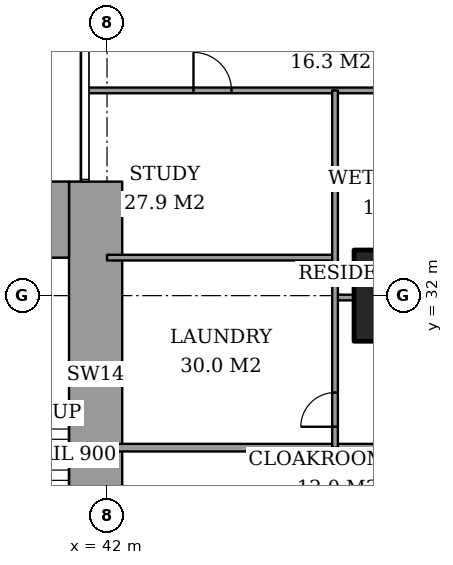
"""IFC4 building model, lengths in metres.
Left out: names, types, materials, properties, quantities, classifications, styles, units other than length and angle.
Written with IfcOpenShell. Run it as: python <this file> out.ifc"""

import sys

from ifc_helpers import new_model, si_unit, direction, frame, frame_2d, origin, origin_2d, place, context, subcontext, project, spatial, rectangle, extrude, element, fill, save


model = new_model("IFC4")
c1 = context("Model", 3, precision=1e-05, world=origin(), true_north=direction((0.0, 1.0)))
c2 = subcontext(c1, "Body", "Model", "MODEL_VIEW")
j1 = project(units=[si_unit("LENGTHUNIT", "METRE"), si_unit("PLANEANGLEUNIT", "RADIAN")], contexts=[c1])
p1 = place(None, origin())
s1 = spatial("IfcSite", under=j1, at=p1, CompositionType="ELEMENT")
p2 = place(p1, origin())
s2 = spatial("IfcBuilding", under=s1, at=p2, CompositionType="ELEMENT")
p3 = place(p2, frame((0.0, 0.0, 114.2)))
s3 = spatial("IfcBuildingStorey", under=s2, at=p3, CompositionType="ELEMENT", Elevation=114.2)
p4 = place(p3, frame((50.0, 32.0, 0.0), z_axis=(0.0, 0.0, 1.0), x_axis=(1.0, 0.0, 0.0)))
e1 = element("IfcColumn", 1, at=p4, inside=s3, PredefinedType="COLUMN", context=c2, shape_type="SweptSolid", body=[
    extrude(rectangle(XDim=3.0, YDim=2.4, at=origin_2d()), origin(), (0.0, 0.0, 1.0), 3.6),
])
p5 = place(p3, frame((37.85, 34.0, 0.0), z_axis=(0.0, 0.0, 1.0), x_axis=(1.0, 0.0, 0.0)))
e2 = element("IfcWall", 2, at=p5, inside=s3, PredefinedType="SHEAR", context=c2, shape_type="SweptSolid", body=[
    extrude(rectangle(XDim=3.15, YDim=2.0, at=frame_2d((1.575, 0.0))), origin(), (0.0, 0.0, 1.0), 3.6),
])
p6 = place(p3, frame((41.7, 24.85, 0.0), z_axis=(0.0, 0.0, 1.0), x_axis=(0.0, 1.0, 0.0)))
e3 = element("IfcWall", 3, at=p6, inside=s3, PredefinedType="SHEAR", context=c2, shape_type="SweptSolid", body=[
    extrude(rectangle(XDim=10.15, YDim=1.4, at=frame_2d((5.075, 0.0))), origin(), (0.0, 0.0, 1.0), 3.6),
])
p7 = place(p3, frame((42.0, 28.0, 0.0), z_axis=(0.0, 0.0, 1.0), x_axis=(1.0, 0.0, 0.0)))
e4 = element("IfcWall", 4, at=p7, inside=s3, PredefinedType="PARTITIONING", context=c2, shape_type="SweptSolid", body=[
    extrude(rectangle(XDim=17.275, YDim=0.2, at=frame_2d((8.637, 0.0))), origin(), (0.0, 0.0, 1.0), 3.35),
])
p8 = place(p7, frame((9.4, 0.0, 0.0)))
e5 = element("IfcOpeningElement", 5, at=p8, cuts=e4, PredefinedType="OPENING", context=c2, shape_type="SweptSolid", body=[
    extrude(rectangle(XDim=1.2, YDim=2.4, at=frame_2d((0.6, 1.2))), frame((0.0, 0.11, 0.0), z_axis=(0.0, -1.0, 0.0), x_axis=(1.0, 0.0, 0.0)), (0.0, 0.0, 1.0), 0.22),
])
p9 = place(p3, frame((48.0, 31.95, 0.0), z_axis=(0.0, 0.0, 1.0), x_axis=(1.0, 0.0, 0.0)))
e6 = element("IfcWall", 6, at=p9, inside=s3, PredefinedType="PARTITIONING", context=c2, shape_type="SweptSolid", body=[
    extrude(rectangle(XDim=0.5, YDim=0.15, at=frame_2d((0.25, 0.0))), origin(), (0.0, 0.0, 1.0), 2.634),
])
p10 = place(p3, frame((42.0, 33.0, 0.0), z_axis=(0.0, 0.0, 1.0), x_axis=(1.0, 0.0, 0.0)))
e7 = element("IfcWall", 7, at=p10, inside=s3, PredefinedType="PARTITIONING", context=c2, shape_type="SweptSolid", body=[
    extrude(rectangle(XDim=6.0, YDim=0.15, at=frame_2d((3.0, 0.0))), origin(), (0.0, 0.0, 1.0), 3.35),
])
p11 = place(p3, frame((41.439, 37.4, 0.0), z_axis=(0.0, 0.0, 1.0), x_axis=(1.0, 0.0, 0.0)))
e8 = element("IfcWall", 8, at=p11, inside=s3, PredefinedType="PARTITIONING", context=c2, shape_type="SweptSolid", body=[
    extrude(rectangle(XDim=25.011, YDim=0.15, at=frame_2d((12.505, 0.0))), origin(), (0.0, 0.0, 1.0), 3.35),
])
p12 = place(p11, frame((10.761, 0.0, 0.0)))
e9 = element("IfcOpeningElement", 9, at=p12, cuts=e8, PredefinedType="OPENING", context=c2, shape_type="SweptSolid", body=[
    extrude(rectangle(XDim=1.0, YDim=2.1, at=frame_2d((0.5, 1.05))), frame((0.0, 0.085, 0.0), z_axis=(0.0, -1.0, 0.0), x_axis=(1.0, 0.0, 0.0)), (0.0, 0.0, 1.0), 0.17),
])
p13 = place(p11, frame((20.924, 0.0, 0.0)))
e10 = element("IfcOpeningElement", 10, at=p13, cuts=e8, PredefinedType="OPENING", context=c2, shape_type="SweptSolid", body=[
    extrude(rectangle(XDim=1.0, YDim=2.1, at=frame_2d((0.5, 1.05))), frame((0.0, 0.085, 0.0), z_axis=(0.0, -1.0, 0.0), x_axis=(1.0, 0.0, 0.0)), (0.0, 0.0, 1.0), 0.17),
])
p14 = place(p11, frame((15.749, 0.0, 0.0)))
e11 = element("IfcOpeningElement", 11, at=p14, cuts=e8, PredefinedType="OPENING", context=c2, shape_type="SweptSolid", body=[
    extrude(rectangle(XDim=0.9, YDim=2.1, at=frame_2d((0.45, 1.05))), frame((0.0, 0.085, 0.0), z_axis=(0.0, -1.0, 0.0), x_axis=(1.0, 0.0, 0.0)), (0.0, 0.0, 1.0), 0.17),
])
p15 = place(p11, frame((12.961, 0.0, 0.0)))
e12 = element("IfcOpeningElement", 12, at=p15, cuts=e8, PredefinedType="OPENING", context=c2, shape_type="SweptSolid", body=[
    extrude(rectangle(XDim=1.0, YDim=2.1, at=frame_2d((0.5, 1.05))), frame((0.0, 0.085, 0.0), z_axis=(0.0, -1.0, 0.0), x_axis=(1.0, 0.0, 0.0)), (0.0, 0.0, 1.0), 0.17),
])
p16 = place(p11, frame((7.861, 0.0, 0.0)))
e13 = element("IfcOpeningElement", 13, at=p16, cuts=e8, PredefinedType="OPENING", context=c2, shape_type="SweptSolid", body=[
    extrude(rectangle(XDim=1.0, YDim=2.1, at=frame_2d((0.5, 1.05))), frame((0.0, 0.085, 0.0), z_axis=(0.0, -1.0, 0.0), x_axis=(1.0, 0.0, 0.0)), (0.0, 0.0, 1.0), 0.17),
])
p17 = place(p11, frame((2.836, 0.0, 0.0)))
e14 = element("IfcOpeningElement", 14, at=p17, cuts=e8, PredefinedType="OPENING", context=c2, shape_type="SweptSolid", body=[
    extrude(rectangle(XDim=1.0, YDim=2.1, at=frame_2d((0.5, 1.05))), frame((0.0, 0.085, 0.0), z_axis=(0.0, -1.0, 0.0), x_axis=(1.0, 0.0, 0.0)), (0.0, 0.0, 1.0), 0.17),
])
p18 = place(p3, frame((48.0, 28.0, 0.0), z_axis=(0.0, 0.0, 1.0), x_axis=(0.0, 1.0, 0.0)))
e15 = element("IfcWall", 15, at=p18, inside=s3, PredefinedType="PARTITIONING", context=c2, shape_type="SweptSolid", body=[
    extrude(rectangle(XDim=9.4, YDim=0.15, at=frame_2d((4.7, 0.0))), origin(), (0.0, 0.0, 1.0), 3.35),
])
p19 = place(p18, frame((0.55, 0.0, 0.0)))
e16 = element("IfcOpeningElement", 16, at=p19, cuts=e15, PredefinedType="OPENING", context=c2, shape_type="SweptSolid", body=[
    extrude(rectangle(XDim=0.9, YDim=2.1, at=frame_2d((0.45, 1.05))), frame((0.0, 0.085, 0.0), z_axis=(0.0, -1.0, 0.0), x_axis=(1.0, 0.0, 0.0)), (0.0, 0.0, 1.0), 0.17),
])
p20 = place(p17, origin())
e17 = element("IfcDoor", 17, at=p20, inside=s3, OperationType="SINGLE_SWING_RIGHT", PredefinedType="DOOR", context=c2, shape_type="SweptSolid", body=[
    extrude(rectangle(XDim=1.0, YDim=2.1, at=frame_2d((0.5, 1.05))), frame((0.0, 0.025, 0.0), z_axis=(0.0, -1.0, 0.0), x_axis=(1.0, 0.0, 0.0)), (0.0, 0.0, 1.0), 0.05),
])
fill(e14, e17)
p21 = place(p19, origin())
e18 = element("IfcDoor", 18, at=p21, inside=s3, OperationType="SINGLE_SWING_RIGHT", PredefinedType="DOOR", context=c2, shape_type="SweptSolid", body=[
    extrude(rectangle(XDim=0.9, YDim=2.1, at=frame_2d((0.45, 1.05))), frame((0.0, 0.025, 0.0), z_axis=(0.0, -1.0, 0.0), x_axis=(1.0, 0.0, 0.0)), (0.0, 0.0, 1.0), 0.05),
])
fill(e16, e18)
save(model, sys.argv[1])
